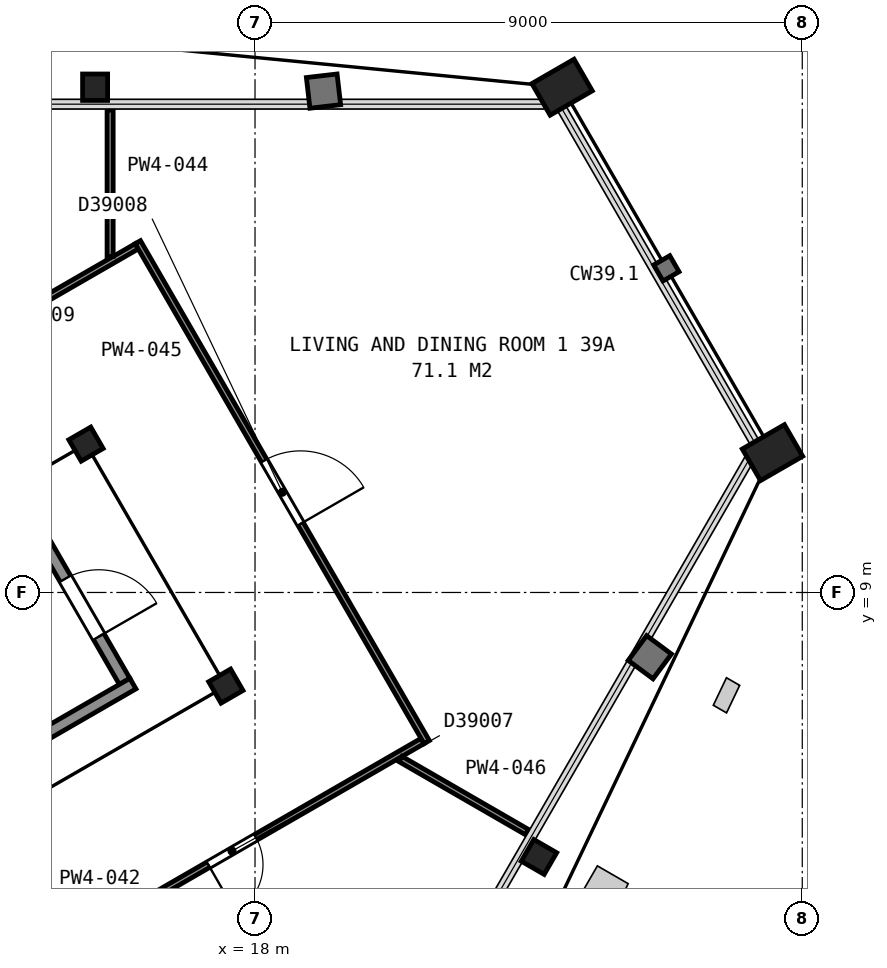
"""IFC4 building model, lengths in metres.
Left out: names, types, materials, properties, quantities, classifications, styles, units other than length and angle.
Written with IfcOpenShell. Run it as: python <this file> out.ifc"""

import sys

from ifc_helpers import new_model, si_unit, direction, frame, frame_2d, origin, origin_2d, place, context, subcontext, project, spatial, rectangle, hollow_rectangle, i_section, extrude, element, fill, save


model = new_model("IFC4")
c1 = context("Model", 3, precision=1e-05, world=origin(), true_north=direction((0.0, 1.0)))
c2 = subcontext(c1, "Body", "Model", "MODEL_VIEW")
j1 = project(units=[si_unit("LENGTHUNIT", "METRE"), si_unit("PLANEANGLEUNIT", "RADIAN")], contexts=[c1])
p1 = place(None, origin())
s1 = spatial("IfcSite", under=j1, at=p1, CompositionType="ELEMENT")
p2 = place(p1, origin())
s2 = spatial("IfcBuilding", under=s1, at=p2, CompositionType="ELEMENT")
p3 = place(p2, frame((0.0, 0.0, 159.9)))
s3 = spatial("IfcBuildingStorey", under=s2, at=p3, CompositionType="ELEMENT", Elevation=159.9)
p4 = place(p3, frame((23.05, 17.31, 0.065), z_axis=(0.0, 0.0, 1.0), x_axis=(0.5, -0.866025403784, 0.0)))
e1 = element("IfcColumn", 1, at=p4, inside=s3, PredefinedType="COLUMN", context=c2, shape_type="SweptSolid", body=[
    extrude(hollow_rectangle(XDim=0.6, YDim=0.8, WallThickness=0.05, at=origin_2d()), origin(), (0.0, 0.0, 1.0), 3.635),
])
for number, where, z_axis, x_axis in (
    (2, (15.37, 17.31, 0.04), (0.0, 0.0, 1.0), (1.0, 0.0, 0.0)),
    (3, (22.67, 4.65, 0.04), (0.0, 0.0, 1.0), (-0.5, -0.866, 0.0)),
):
    element("IfcColumn", number, at=place(p3, frame(where, z_axis=z_axis, x_axis=x_axis)), inside=s3, PredefinedType="COLUMN", context=c2, shape_type="SweptSolid", body=[
        extrude(i_section(OverallWidth=0.411, OverallDepth=0.434, WebThickness=0.036, FlangeThickness=0.057, FilletRadius=0.015, at=origin_2d()), origin(), (0.0, 0.0, 1.0), 3.66),
    ])
p5 = place(p3, frame((26.51, 11.3, 0.065), z_axis=(0.0, 0.0, 1.0), x_axis=(0.5, -0.866025403784, 0.0)))
e4 = element("IfcColumn", 4, at=p5, inside=s3, PredefinedType="COLUMN", context=c2, shape_type="SweptSolid", body=[
    extrude(hollow_rectangle(XDim=0.6, YDim=0.8, WallThickness=0.05, at=origin_2d()), origin(), (0.0, 0.0, 1.0), 3.635),
])
for number, where, z_axis, x_axis in (
    (5, (17.52, 7.46, 0.0), (0.0, 0.0, 1.0), (0.5, -0.866, 0.0)),
    (6, (15.22, 11.44, 0.0), (0.0, 0.0, 1.0), (0.5, -0.866, 0.0)),
):
    element("IfcColumn", number, at=place(p3, frame(where, z_axis=z_axis, x_axis=x_axis)), inside=s3, PredefinedType="COLUMN", context=c2, shape_type="SweptSolid", body=[
        extrude(i_section(OverallWidth=0.406, OverallDepth=0.417, WebThickness=0.03, FlangeThickness=0.048, FilletRadius=0.015, at=origin_2d()), origin(), (0.0, 0.0, 1.0), 3.7),
    ])
p6 = place(p3, frame((15.855, 7.538, 0.0), z_axis=(0.0, 0.0, 1.0), x_axis=(-0.500049511043, 0.865996816683, 0.0)))
e7 = element("IfcWall", 7, at=p6, inside=s3, PredefinedType="PARTITIONING", context=c2, shape_type="SweptSolid", body=[
    extrude(rectangle(XDim=2.8, YDim=0.2, at=frame_2d((1.4, 0.0))), origin(), (0.0, 0.0, 1.0), 3.45),
])
p7 = place(p6, frame((0.85, 0.0, 0.0)))
e8 = element("IfcOpeningElement", 8, at=p7, cuts=e7, PredefinedType="OPENING", context=c2, shape_type="SweptSolid", body=[
    extrude(rectangle(XDim=1.1, YDim=2.1, at=frame_2d((0.55, 1.05))), frame((0.0, 0.11, 0.0), z_axis=(0.0, -1.0, 0.0), x_axis=(1.0, 0.0, 0.0)), (0.0, 0.0, 1.0), 0.22),
])
p8 = place(p3, frame((7.678, 2.701, 0.0), z_axis=(0.0, 0.0, 1.0), x_axis=(0.866019993635, 0.500009370536, 0.0)))
e9 = element("IfcWall", 9, at=p8, inside=s3, PredefinedType="PARTITIONING", context=c2, shape_type="SweptSolid", body=[
    extrude(rectangle(XDim=9.6, YDim=0.2, at=frame_2d((4.8, 0.0))), origin(), (0.0, 0.0, 1.0), 3.45),
])
p9 = place(p3, frame((8.691, 10.442, 0.0), z_axis=(0.0, 0.0, 1.0), x_axis=(0.866070360466, 0.499922124658, 0.0)))
e10 = element("IfcWall", 10, at=p9, inside=s3, PredefinedType="PARTITIONING", context=c2, shape_type="SweptSolid", body=[
    extrude(rectangle(XDim=8.503, YDim=0.1, at=frame_2d((4.251, 0.0))), origin(), (0.0, 0.0, 1.0), 2.713),
])
p10 = place(p9, frame((4.758, 0.0, 0.0)))
e11 = element("IfcOpeningElement", 11, at=p10, cuts=e10, PredefinedType="OPENING", context=c2, shape_type="SweptSolid", body=[
    extrude(rectangle(XDim=0.9, YDim=2.1, at=frame_2d((0.45, 1.05))), frame((0.0, 0.06, 0.0), z_axis=(0.0, -1.0, 0.0), x_axis=(1.0, 0.0, 0.0)), (0.0, 0.0, 1.0), 0.12),
])
p11 = place(p9, frame((0.715, 0.0, 0.0)))
e12 = element("IfcOpeningElement", 12, at=p11, cuts=e10, PredefinedType="OPENING", context=c2, shape_type="SweptSolid", body=[
    extrude(rectangle(XDim=0.9, YDim=2.1, at=frame_2d((0.45, 1.05))), frame((0.0, 0.06, 0.0), z_axis=(0.0, -1.0, 0.0), x_axis=(1.0, 0.0, 0.0)), (0.0, 0.0, 1.0), 0.12),
])
p12 = place(p3, frame((20.756, 6.557, 0.0), z_axis=(0.0, 0.0, 1.0), x_axis=(-0.866069146081, -0.499924228466, 0.0)))
e13 = element("IfcWall", 13, at=p12, inside=s3, PredefinedType="PARTITIONING", context=c2, shape_type="SweptSolid", body=[
    extrude(rectangle(XDim=8.519, YDim=0.1, at=frame_2d((4.259, 0.0))), origin(), (0.0, 0.0, 1.0), 2.713),
])
p13 = place(p12, frame((7.239, 0.0, 0.0)))
e14 = element("IfcOpeningElement", 14, at=p13, cuts=e13, PredefinedType="OPENING", context=c2, shape_type="SweptSolid", body=[
    extrude(rectangle(XDim=0.9, YDim=2.1, at=frame_2d((0.45, 1.05))), frame((0.0, 0.06, 0.0), z_axis=(0.0, -1.0, 0.0), x_axis=(1.0, 0.0, 0.0)), (0.0, 0.0, 1.0), 0.12),
])
p14 = place(p12, frame((3.169, 0.0, 0.0)))
e15 = element("IfcOpeningElement", 15, at=p14, cuts=e13, PredefinedType="OPENING", context=c2, shape_type="SweptSolid", body=[
    extrude(rectangle(XDim=0.9, YDim=2.1, at=frame_2d((0.45, 1.05))), frame((0.0, 0.06, 0.0), z_axis=(0.0, -1.0, 0.0), x_axis=(1.0, 0.0, 0.0)), (0.0, 0.0, 1.0), 0.12),
])
p15 = place(p3, frame((15.617, 14.527, 0.0), z_axis=(0.0, 0.0, 1.0), x_axis=(0.0, 1.0, 0.0)))
e16 = element("IfcWall", 16, at=p15, inside=s3, PredefinedType="PARTITIONING", context=c2, shape_type="SweptSolid", body=[
    extrude(rectangle(XDim=2.408, YDim=0.1, at=frame_2d((1.204, 0.0))), origin(), (0.0, 0.0, 1.0), 2.713),
])
p16 = place(p3, frame((16.073, 14.761, 0.0), z_axis=(0.0, 0.0, 1.0), x_axis=(0.500297300687, -0.865853689098, 0.0)))
e17 = element("IfcWall", 17, at=p16, inside=s3, PredefinedType="PARTITIONING", context=c2, shape_type="SweptSolid", body=[
    extrude(rectangle(XDim=9.496, YDim=0.1, at=frame_2d((4.748, 0.0))), origin(), (0.0, 0.0, 1.0), 2.713),
])
p17 = place(p16, frame((4.15, 0.0, 0.0)))
e18 = element("IfcOpeningElement", 18, at=p17, cuts=e17, PredefinedType="OPENING", context=c2, shape_type="SweptSolid", body=[
    extrude(rectangle(XDim=1.2, YDim=2.1, at=frame_2d((0.6, 1.05))), frame((0.0, 0.06, 0.0), z_axis=(0.0, -1.0, 0.0), x_axis=(1.0, 0.0, 0.0)), (0.0, 0.0, 1.0), 0.12),
])
p18 = place(p3, frame((20.392, 6.261, 0.0), z_axis=(0.0, 0.0, 1.0), x_axis=(0.865953976614, -0.500123695086, 0.0)))
e19 = element("IfcWall", 19, at=p18, inside=s3, PredefinedType="PARTITIONING", context=c2, shape_type="SweptSolid", body=[
    extrude(rectangle(XDim=2.405, YDim=0.1, at=frame_2d((1.203, 0.0))), origin(), (0.0, 0.0, 1.0), 2.713),
])
p19 = place(p7, origin())
e20 = element("IfcDoor", 20, at=p19, inside=s3, OperationType="SINGLE_SWING_LEFT", PredefinedType="DOOR", context=c2, shape_type="SweptSolid", body=[
    extrude(rectangle(XDim=1.1, YDim=2.1, at=frame_2d((0.55, 1.05))), frame((0.0, 0.025, 0.0), z_axis=(0.0, -1.0, 0.0), x_axis=(1.0, 0.0, 0.0)), (0.0, 0.0, 1.0), 0.05),
])
fill(e8, e20)
p20 = place(p14, origin())
e21 = element("IfcDoor", 21, at=p20, inside=s3, OperationType="SINGLE_SWING_RIGHT", PredefinedType="DOOR", context=c2, shape_type="SweptSolid", body=[
    extrude(rectangle(XDim=0.9, YDim=2.1, at=frame_2d((0.45, 1.05))), frame((0.0, 0.025, 0.0), z_axis=(0.0, -1.0, 0.0), x_axis=(1.0, 0.0, 0.0)), (0.0, 0.0, 1.0), 0.05),
])
fill(e15, e21)
p21 = place(p17, origin())
e22 = element("IfcDoor", 22, at=p21, inside=s3, OperationType="SINGLE_SWING_RIGHT", PredefinedType="DOOR", context=c2, shape_type="SweptSolid", body=[
    extrude(rectangle(XDim=1.2, YDim=2.1, at=frame_2d((0.6, 1.05))), frame((0.0, 0.025, 0.0), z_axis=(0.0, -1.0, 0.0), x_axis=(1.0, 0.0, 0.0)), (0.0, 0.0, 1.0), 0.05),
])
fill(e18, e22)
save(model, sys.argv[1])
